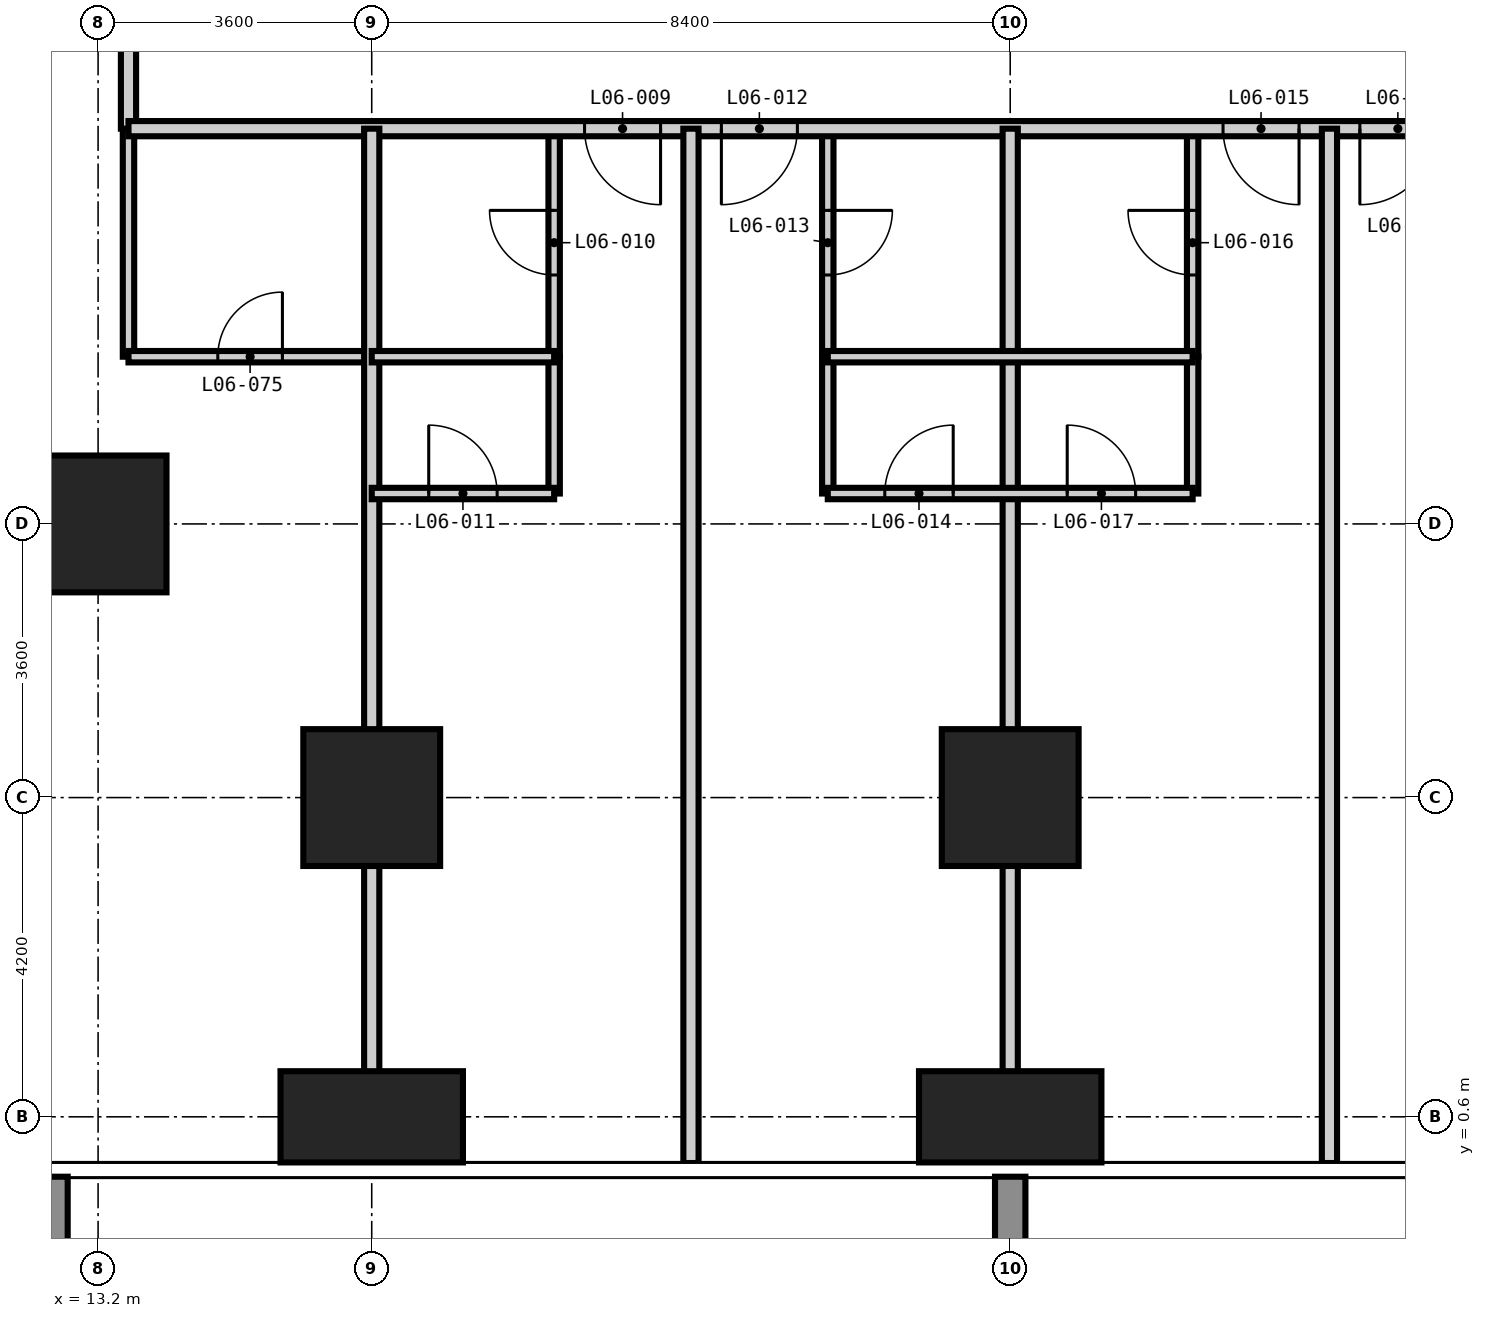
"""IFC4 building model, lengths in metres.
Left out: names, types, materials, properties, quantities, classifications, styles, units other than length and angle.
Written with IfcOpenShell. Run it as: python <this file> out.ifc"""

import sys

from ifc_helpers import new_model, si_unit, direction, frame, frame_2d, origin, origin_2d, place, context, subcontext, project, spatial, rectangle, extrude, element, fill, save


model = new_model("IFC4")
c1 = context("Model", 3, precision=1e-05, world=origin(), true_north=direction((0.0, 1.0)))
c2 = subcontext(c1, "Body", "Model", "MODEL_VIEW")
j1 = project(units=[si_unit("LENGTHUNIT", "METRE"), si_unit("PLANEANGLEUNIT", "RADIAN")], contexts=[c1])
p1 = place(None, origin())
s1 = spatial("IfcSite", under=j1, at=p1, CompositionType="ELEMENT")
p2 = place(p1, origin())
s2 = spatial("IfcBuilding", under=s1, at=p2, CompositionType="ELEMENT")
p3 = place(p2, frame((0.0, 0.0, 30.6)))
s3 = spatial("IfcBuildingStorey", under=s2, at=p3, CompositionType="ELEMENT", Elevation=30.6)
p4 = place(p3, frame((13.2, 8.4, -0.35), z_axis=(0.0, 0.0, 1.0), x_axis=(1.0, 0.0, 0.0)))
e1 = element("IfcColumn", 1, at=p4, inside=s3, PredefinedType="COLUMN", context=c2, shape_type="SweptSolid", body=[
    extrude(rectangle(XDim=1.8, YDim=1.8, at=origin_2d()), origin(), (0.0, 0.0, 1.0), 3.6),
])
p5 = place(p3, frame((16.8, 0.6, -0.35), z_axis=(0.0, 0.0, 1.0), x_axis=(1.0, 0.0, 0.0)))
e2 = element("IfcColumn", 2, at=p5, inside=s3, PredefinedType="COLUMN", context=c2, shape_type="SweptSolid", body=[
    extrude(rectangle(XDim=2.4, YDim=1.2, at=origin_2d()), origin(), (0.0, 0.0, 1.0), 3.6),
])
p6 = place(p3, frame((16.8, 4.8, -0.35), z_axis=(0.0, 0.0, 1.0), x_axis=(1.0, 0.0, 0.0)))
e3 = element("IfcColumn", 3, at=p6, inside=s3, PredefinedType="COLUMN", context=c2, shape_type="SweptSolid", body=[
    extrude(rectangle(XDim=1.8, YDim=1.8, at=origin_2d()), origin(), (0.0, 0.0, 1.0), 3.6),
])
p7 = place(p3, frame((25.2, 0.6, -0.35), z_axis=(0.0, 0.0, 1.0), x_axis=(1.0, 0.0, 0.0)))
e4 = element("IfcColumn", 4, at=p7, inside=s3, PredefinedType="COLUMN", context=c2, shape_type="SweptSolid", body=[
    extrude(rectangle(XDim=2.4, YDim=1.2, at=origin_2d()), origin(), (0.0, 0.0, 1.0), 3.6),
])
p8 = place(p3, frame((25.2, 4.8, -0.35), z_axis=(0.0, 0.0, 1.0), x_axis=(1.0, 0.0, 0.0)))
e5 = element("IfcColumn", 5, at=p8, inside=s3, PredefinedType="COLUMN", context=c2, shape_type="SweptSolid", body=[
    extrude(rectangle(XDim=1.8, YDim=1.8, at=origin_2d()), origin(), (0.0, 0.0, 1.0), 3.6),
])
p9 = place(p3, frame((13.6, 10.6, 0.0), z_axis=(0.0, 0.0, 1.0), x_axis=(0.0, 1.0, 0.0)))
e6 = element("IfcWall", 6, at=p9, inside=s3, PredefinedType="PARTITIONING", context=c2, shape_type="SweptSolid", body=[
    extrude(rectangle(XDim=3.0, YDim=0.15, at=frame_2d((1.5, 0.0))), origin(), (0.0, 0.0, 1.0), 3.25),
])
p10 = place(p3, frame((19.2, 10.6, 0.0), z_axis=(0.0, 0.0, 1.0), x_axis=(0.0, 1.0, 0.0)))
e7 = element("IfcWall", 7, at=p10, inside=s3, PredefinedType="PARTITIONING", context=c2, shape_type="SweptSolid", body=[
    extrude(rectangle(XDim=3.0, YDim=0.15, at=frame_2d((1.5, 0.0))), origin(), (0.0, 0.0, 1.0), 3.25),
])
p11 = place(p10, frame((1.075, 0.0, 0.0)))
e8 = element("IfcOpeningElement", 8, at=p11, cuts=e7, PredefinedType="OPENING", context=c2, shape_type="SweptSolid", body=[
    extrude(rectangle(XDim=0.85, YDim=2.1, at=frame_2d((0.425, 1.05))), frame((0.0, 0.085, 0.0), z_axis=(0.0, -1.0, 0.0), x_axis=(1.0, 0.0, 0.0)), (0.0, 0.0, 1.0), 0.17),
])
p12 = place(p3, frame((22.8, 10.6, 0.0), z_axis=(0.0, 0.0, 1.0), x_axis=(0.0, 1.0, 0.0)))
e9 = element("IfcWall", 9, at=p12, inside=s3, PredefinedType="PARTITIONING", context=c2, shape_type="SweptSolid", body=[
    extrude(rectangle(XDim=3.0, YDim=0.15, at=frame_2d((1.5, 0.0))), origin(), (0.0, 0.0, 1.0), 3.25),
])
p13 = place(p12, frame((1.075, 0.0, 0.0)))
e10 = element("IfcOpeningElement", 10, at=p13, cuts=e9, PredefinedType="OPENING", context=c2, shape_type="SweptSolid", body=[
    extrude(rectangle(XDim=0.85, YDim=2.1, at=frame_2d((0.425, 1.05))), frame((0.0, 0.085, 0.0), z_axis=(0.0, -1.0, 0.0), x_axis=(1.0, 0.0, 0.0)), (0.0, 0.0, 1.0), 0.17),
])
p14 = place(p3, frame((27.6, 10.6, 0.0), z_axis=(0.0, 0.0, 1.0), x_axis=(0.0, 1.0, 0.0)))
e11 = element("IfcWall", 11, at=p14, inside=s3, PredefinedType="PARTITIONING", context=c2, shape_type="SweptSolid", body=[
    extrude(rectangle(XDim=3.0, YDim=0.15, at=frame_2d((1.5, 0.0))), origin(), (0.0, 0.0, 1.0), 3.25),
])
p15 = place(p14, frame((1.075, 0.0, 0.0)))
e12 = element("IfcOpeningElement", 12, at=p15, cuts=e11, PredefinedType="OPENING", context=c2, shape_type="SweptSolid", body=[
    extrude(rectangle(XDim=0.85, YDim=2.1, at=frame_2d((0.425, 1.05))), frame((0.0, 0.085, 0.0), z_axis=(0.0, -1.0, 0.0), x_axis=(1.0, 0.0, 0.0)), (0.0, 0.0, 1.0), 0.17),
])
p16 = place(p3, frame((13.6, 10.6, 0.0), z_axis=(0.0, 0.0, 1.0), x_axis=(1.0, 0.0, 0.0)))
e13 = element("IfcWall", 13, at=p16, inside=s3, PredefinedType="PARTITIONING", context=c2, shape_type="SweptSolid", body=[
    extrude(rectangle(XDim=3.2, YDim=0.15, at=frame_2d((1.6, 0.0))), origin(), (0.0, 0.0, 1.0), 3.25),
])
p17 = place(p16, frame((1.175, 0.0, 0.0)))
e14 = element("IfcOpeningElement", 14, at=p17, cuts=e13, PredefinedType="OPENING", context=c2, shape_type="SweptSolid", body=[
    extrude(rectangle(XDim=0.85, YDim=2.1, at=frame_2d((0.425, 1.05))), frame((0.0, 0.085, 0.0), z_axis=(0.0, -1.0, 0.0), x_axis=(1.0, 0.0, 0.0)), (0.0, 0.0, 1.0), 0.17),
])
p18 = place(p3, frame((13.6, 13.6, 0.0), z_axis=(0.0, 0.0, 1.0), x_axis=(0.0, 1.0, 0.0)))
e15 = element("IfcWall", 15, at=p18, inside=s3, PredefinedType="PARTITIONING", context=c2, shape_type="SweptSolid", body=[
    extrude(rectangle(XDim=20.0, YDim=0.2, at=frame_2d((10.0, 0.0))), origin(), (0.0, 0.0, 1.0), 3.25),
])
p19 = place(p18, frame((6.0, 0.0, 0.0)))
e16 = element("IfcOpeningElement", 16, at=p19, cuts=e15, PredefinedType="OPENING", context=c2, shape_type="SweptSolid", body=[
    extrude(rectangle(XDim=1.0, YDim=2.2, at=frame_2d((0.5, 1.1))), frame((0.0, 0.11, 0.0), z_axis=(0.0, -1.0, 0.0), x_axis=(1.0, 0.0, 0.0)), (0.0, 0.0, 1.0), 0.22),
])
p20 = place(p18, frame((7.8, 0.0, 0.0)))
e17 = element("IfcOpeningElement", 17, at=p20, cuts=e15, PredefinedType="OPENING", context=c2, shape_type="SweptSolid", body=[
    extrude(rectangle(XDim=1.0, YDim=2.2, at=frame_2d((0.5, 1.1))), frame((0.0, 0.11, 0.0), z_axis=(0.0, -1.0, 0.0), x_axis=(1.0, 0.0, 0.0)), (0.0, 0.0, 1.0), 0.22),
])
p21 = place(p18, frame((14.4, 0.0, 0.0)))
e18 = element("IfcOpeningElement", 18, at=p21, cuts=e15, PredefinedType="OPENING", context=c2, shape_type="SweptSolid", body=[
    extrude(rectangle(XDim=1.0, YDim=2.2, at=frame_2d((0.5, 1.1))), frame((0.0, 0.11, 0.0), z_axis=(0.0, -1.0, 0.0), x_axis=(1.0, 0.0, 0.0)), (0.0, 0.0, 1.0), 0.22),
])
p22 = place(p18, frame((16.2, 0.0, 0.0)))
e19 = element("IfcOpeningElement", 19, at=p22, cuts=e15, PredefinedType="OPENING", context=c2, shape_type="SweptSolid", body=[
    extrude(rectangle(XDim=1.0, YDim=2.2, at=frame_2d((0.5, 1.1))), frame((0.0, 0.11, 0.0), z_axis=(0.0, -1.0, 0.0), x_axis=(1.0, 0.0, 0.0)), (0.0, 0.0, 1.0), 0.22),
])
p23 = place(p18, frame((1.1, 0.0, 0.0)))
e20 = element("IfcOpeningElement", 20, at=p23, cuts=e15, PredefinedType="OPENING", context=c2, shape_type="SweptSolid", body=[
    extrude(rectangle(XDim=1.0, YDim=2.2, at=frame_2d((0.5, 1.1))), frame((0.0, 0.11, 0.0), z_axis=(0.0, -1.0, 0.0), x_axis=(1.0, 0.0, 0.0)), (0.0, 0.0, 1.0), 0.22),
])
p24 = place(p3, frame((45.5, 13.6, 0.0), z_axis=(0.0, 0.0, 1.0), x_axis=(-1.0, 0.0, 0.0)))
e21 = element("IfcWall", 21, at=p24, inside=s3, PredefinedType="PARTITIONING", context=c2, shape_type="SweptSolid", body=[
    extrude(rectangle(XDim=31.9, YDim=0.2, at=frame_2d((15.95, 0.0))), origin(), (0.0, 0.0, 1.0), 3.25),
])
p25 = place(p24, frame((24.9, 0.0, 0.0)))
e22 = element("IfcOpeningElement", 22, at=p25, cuts=e21, PredefinedType="OPENING", context=c2, shape_type="SweptSolid", body=[
    extrude(rectangle(XDim=1.0, YDim=2.2, at=frame_2d((0.5, 1.1))), frame((0.0, 0.11, 0.0), z_axis=(0.0, -1.0, 0.0), x_axis=(1.0, 0.0, 0.0)), (0.0, 0.0, 1.0), 0.22),
])
p26 = place(p24, frame((23.1, 0.0, 0.0)))
e23 = element("IfcOpeningElement", 23, at=p26, cuts=e21, PredefinedType="OPENING", context=c2, shape_type="SweptSolid", body=[
    extrude(rectangle(XDim=1.0, YDim=2.2, at=frame_2d((0.5, 1.1))), frame((0.0, 0.11, 0.0), z_axis=(0.0, -1.0, 0.0), x_axis=(1.0, 0.0, 0.0)), (0.0, 0.0, 1.0), 0.22),
])
p27 = place(p24, frame((16.5, 0.0, 0.0)))
e24 = element("IfcOpeningElement", 24, at=p27, cuts=e21, PredefinedType="OPENING", context=c2, shape_type="SweptSolid", body=[
    extrude(rectangle(XDim=1.0, YDim=2.2, at=frame_2d((0.5, 1.1))), frame((0.0, 0.11, 0.0), z_axis=(0.0, -1.0, 0.0), x_axis=(1.0, 0.0, 0.0)), (0.0, 0.0, 1.0), 0.22),
])
p28 = place(p24, frame((14.7, 0.0, 0.0)))
e25 = element("IfcOpeningElement", 25, at=p28, cuts=e21, PredefinedType="OPENING", context=c2, shape_type="SweptSolid", body=[
    extrude(rectangle(XDim=1.0, YDim=2.2, at=frame_2d((0.5, 1.1))), frame((0.0, 0.11, 0.0), z_axis=(0.0, -1.0, 0.0), x_axis=(1.0, 0.0, 0.0)), (0.0, 0.0, 1.0), 0.22),
])
p29 = place(p24, frame((8.1, 0.0, 0.0)))
e26 = element("IfcOpeningElement", 26, at=p29, cuts=e21, PredefinedType="OPENING", context=c2, shape_type="SweptSolid", body=[
    extrude(rectangle(XDim=1.0, YDim=2.2, at=frame_2d((0.5, 1.1))), frame((0.0, 0.11, 0.0), z_axis=(0.0, -1.0, 0.0), x_axis=(1.0, 0.0, 0.0)), (0.0, 0.0, 1.0), 0.22),
])
p30 = place(p24, frame((6.3, 0.0, 0.0)))
e27 = element("IfcOpeningElement", 27, at=p30, cuts=e21, PredefinedType="OPENING", context=c2, shape_type="SweptSolid", body=[
    extrude(rectangle(XDim=1.0, YDim=2.2, at=frame_2d((0.5, 1.1))), frame((0.0, 0.11, 0.0), z_axis=(0.0, -1.0, 0.0), x_axis=(1.0, 0.0, 0.0)), (0.0, 0.0, 1.0), 0.22),
])
for number, where, z_axis, x_axis in (
    (28, (16.8, -0.008, 0.0), (0.0, 0.0, 1.0), (0.0, 1.0, 0.0)),
    (29, (21.0, -0.008, 0.0), (0.0, 0.0, 1.0), (0.0, 1.0, 0.0)),
    (30, (25.2, -0.008, 0.0), (0.0, 0.0, 1.0), (0.0, 1.0, 0.0)),
    (31, (29.4, -0.008, 0.0), (0.0, 0.0, 1.0), (0.0, 1.0, 0.0)),
):
    element("IfcWall", number, at=place(p3, frame(where, z_axis=z_axis, x_axis=x_axis)), inside=s3, PredefinedType="PARTITIONING", context=c2, shape_type="SweptSolid", body=[
        extrude(rectangle(XDim=13.608, YDim=0.2, at=frame_2d((6.804, 0.0))), origin(), (0.0, 0.0, 1.0), 3.25),
    ])
for number, where, z_axis, x_axis in (
    (32, (19.2, 8.8, 0.0), (0.0, 0.0, 1.0), (0.0, 1.0, 0.0)),
    (33, (22.8, 8.8, 0.0), (0.0, 0.0, 1.0), (0.0, 1.0, 0.0)),
    (34, (27.6, 8.8, 0.0), (0.0, 0.0, 1.0), (0.0, 1.0, 0.0)),
):
    element("IfcWall", number, at=place(p3, frame(where, z_axis=z_axis, x_axis=x_axis)), inside=s3, PredefinedType="PARTITIONING", context=c2, shape_type="SweptSolid", body=[
        extrude(rectangle(XDim=1.8, YDim=0.15, at=frame_2d((0.9, 0.0))), origin(), (0.0, 0.0, 1.0), 3.25),
    ])
p31 = place(p3, frame((16.8, 8.8, 0.0), z_axis=(0.0, 0.0, 1.0), x_axis=(1.0, 0.0, 0.0)))
e35 = element("IfcWall", 35, at=p31, inside=s3, PredefinedType="PARTITIONING", context=c2, shape_type="SweptSolid", body=[
    extrude(rectangle(XDim=2.4, YDim=0.15, at=frame_2d((1.2, 0.0))), origin(), (0.0, 0.0, 1.0), 3.25),
])
p32 = place(p31, frame((0.75, 0.0, 0.0)))
e36 = element("IfcOpeningElement", 36, at=p32, cuts=e35, PredefinedType="OPENING", context=c2, shape_type="SweptSolid", body=[
    extrude(rectangle(XDim=0.9, YDim=2.1, at=frame_2d((0.45, 1.05))), frame((0.0, 0.085, 0.0), z_axis=(0.0, -1.0, 0.0), x_axis=(1.0, 0.0, 0.0)), (0.0, 0.0, 1.0), 0.17),
])
p33 = place(p3, frame((22.8, 8.8, 0.0), z_axis=(0.0, 0.0, 1.0), x_axis=(1.0, 0.0, 0.0)))
e37 = element("IfcWall", 37, at=p33, inside=s3, PredefinedType="PARTITIONING", context=c2, shape_type="SweptSolid", body=[
    extrude(rectangle(XDim=4.8, YDim=0.15, at=frame_2d((2.4, 0.0))), origin(), (0.0, 0.0, 1.0), 3.25),
])
p34 = place(p33, frame((0.75, 0.0, 0.0)))
e38 = element("IfcOpeningElement", 38, at=p34, cuts=e37, PredefinedType="OPENING", context=c2, shape_type="SweptSolid", body=[
    extrude(rectangle(XDim=0.9, YDim=2.1, at=frame_2d((0.45, 1.05))), frame((0.0, 0.085, 0.0), z_axis=(0.0, -1.0, 0.0), x_axis=(1.0, 0.0, 0.0)), (0.0, 0.0, 1.0), 0.17),
])
p35 = place(p33, frame((3.15, 0.0, 0.0)))
e39 = element("IfcOpeningElement", 39, at=p35, cuts=e37, PredefinedType="OPENING", context=c2, shape_type="SweptSolid", body=[
    extrude(rectangle(XDim=0.9, YDim=2.1, at=frame_2d((0.45, 1.05))), frame((0.0, 0.085, 0.0), z_axis=(0.0, -1.0, 0.0), x_axis=(1.0, 0.0, 0.0)), (0.0, 0.0, 1.0), 0.17),
])
p36 = place(p3, frame((16.8, 10.6, 0.0), z_axis=(0.0, 0.0, 1.0), x_axis=(1.0, 0.0, 0.0)))
e40 = element("IfcWall", 40, at=p36, inside=s3, PredefinedType="PARTITIONING", context=c2, shape_type="SweptSolid", body=[
    extrude(rectangle(XDim=2.4, YDim=0.15, at=frame_2d((1.2, 0.0))), origin(), (0.0, 0.0, 1.0), 3.25),
])
p37 = place(p3, frame((22.8, 10.6, 0.0), z_axis=(0.0, 0.0, 1.0), x_axis=(1.0, 0.0, 0.0)))
e41 = element("IfcWall", 41, at=p37, inside=s3, PredefinedType="PARTITIONING", context=c2, shape_type="SweptSolid", body=[
    extrude(rectangle(XDim=4.8, YDim=0.15, at=frame_2d((2.4, 0.0))), origin(), (0.0, 0.0, 1.0), 3.25),
])
p38 = place(p25, origin())
e42 = element("IfcDoor", 42, at=p38, inside=s3, OperationType="SINGLE_SWING_LEFT", PredefinedType="DOOR", context=c2, shape_type="SweptSolid", body=[
    extrude(rectangle(XDim=1.0, YDim=2.2, at=frame_2d((0.5, 1.1))), frame((0.0, 0.025, 0.0), z_axis=(0.0, -1.0, 0.0), x_axis=(1.0, 0.0, 0.0)), (0.0, 0.0, 1.0), 0.05),
])
fill(e22, e42)
p39 = place(p11, origin())
e43 = element("IfcDoor", 43, at=p39, inside=s3, OperationType="SINGLE_SWING_RIGHT", PredefinedType="DOOR", context=c2, shape_type="SweptSolid", body=[
    extrude(rectangle(XDim=0.85, YDim=2.1, at=frame_2d((0.425, 1.05))), frame((0.0, 0.025, 0.0), z_axis=(0.0, -1.0, 0.0), x_axis=(1.0, 0.0, 0.0)), (0.0, 0.0, 1.0), 0.05),
])
fill(e8, e43)
p40 = place(p32, origin())
e44 = element("IfcDoor", 44, at=p40, inside=s3, OperationType="SINGLE_SWING_LEFT", PredefinedType="DOOR", context=c2, shape_type="SweptSolid", body=[
    extrude(rectangle(XDim=0.9, YDim=2.1, at=frame_2d((0.45, 1.05))), frame((0.0, 0.025, 0.0), z_axis=(0.0, -1.0, 0.0), x_axis=(1.0, 0.0, 0.0)), (0.0, 0.0, 1.0), 0.05),
])
fill(e36, e44)
p41 = place(p26, origin())
e45 = element("IfcDoor", 45, at=p41, inside=s3, OperationType="SINGLE_SWING_RIGHT", PredefinedType="DOOR", context=c2, shape_type="SweptSolid", body=[
    extrude(rectangle(XDim=1.0, YDim=2.2, at=frame_2d((0.5, 1.1))), frame((0.0, 0.025, 0.0), z_axis=(0.0, -1.0, 0.0), x_axis=(1.0, 0.0, 0.0)), (0.0, 0.0, 1.0), 0.05),
])
fill(e23, e45)
p42 = place(p13, frame((0.85, 0.0, 0.0), z_axis=(0.0, 0.0, 1.0), x_axis=(-1.0, 0.0, 0.0)))
e46 = element("IfcDoor", 46, at=p42, inside=s3, OperationType="SINGLE_SWING_LEFT", PredefinedType="DOOR", context=c2, shape_type="SweptSolid", body=[
    extrude(rectangle(XDim=0.85, YDim=2.1, at=frame_2d((0.425, 1.05))), frame((0.0, 0.025, 0.0), z_axis=(0.0, -1.0, 0.0), x_axis=(1.0, 0.0, 0.0)), (0.0, 0.0, 1.0), 0.05),
])
fill(e10, e46)
p43 = place(p34, origin())
e47 = element("IfcDoor", 47, at=p43, inside=s3, OperationType="SINGLE_SWING_RIGHT", PredefinedType="DOOR", context=c2, shape_type="SweptSolid", body=[
    extrude(rectangle(XDim=0.9, YDim=2.1, at=frame_2d((0.45, 1.05))), frame((0.0, 0.025, 0.0), z_axis=(0.0, -1.0, 0.0), x_axis=(1.0, 0.0, 0.0)), (0.0, 0.0, 1.0), 0.05),
])
fill(e38, e47)
p44 = place(p27, origin())
e48 = element("IfcDoor", 48, at=p44, inside=s3, OperationType="SINGLE_SWING_LEFT", PredefinedType="DOOR", context=c2, shape_type="SweptSolid", body=[
    extrude(rectangle(XDim=1.0, YDim=2.2, at=frame_2d((0.5, 1.1))), frame((0.0, 0.025, 0.0), z_axis=(0.0, -1.0, 0.0), x_axis=(1.0, 0.0, 0.0)), (0.0, 0.0, 1.0), 0.05),
])
fill(e24, e48)
p45 = place(p15, origin())
e49 = element("IfcDoor", 49, at=p45, inside=s3, OperationType="SINGLE_SWING_RIGHT", PredefinedType="DOOR", context=c2, shape_type="SweptSolid", body=[
    extrude(rectangle(XDim=0.85, YDim=2.1, at=frame_2d((0.425, 1.05))), frame((0.0, 0.025, 0.0), z_axis=(0.0, -1.0, 0.0), x_axis=(1.0, 0.0, 0.0)), (0.0, 0.0, 1.0), 0.05),
])
fill(e12, e49)
p46 = place(p35, origin())
e50 = element("IfcDoor", 50, at=p46, inside=s3, OperationType="SINGLE_SWING_LEFT", PredefinedType="DOOR", context=c2, shape_type="SweptSolid", body=[
    extrude(rectangle(XDim=0.9, YDim=2.1, at=frame_2d((0.45, 1.05))), frame((0.0, 0.025, 0.0), z_axis=(0.0, -1.0, 0.0), x_axis=(1.0, 0.0, 0.0)), (0.0, 0.0, 1.0), 0.05),
])
fill(e39, e50)
p47 = place(p28, origin())
e51 = element("IfcDoor", 51, at=p47, inside=s3, OperationType="SINGLE_SWING_RIGHT", PredefinedType="DOOR", context=c2, shape_type="SweptSolid", body=[
    extrude(rectangle(XDim=1.0, YDim=2.2, at=frame_2d((0.5, 1.1))), frame((0.0, 0.025, 0.0), z_axis=(0.0, -1.0, 0.0), x_axis=(1.0, 0.0, 0.0)), (0.0, 0.0, 1.0), 0.05),
])
fill(e25, e51)
p48 = place(p17, origin())
e52 = element("IfcDoor", 52, at=p48, inside=s3, OperationType="SINGLE_SWING_RIGHT", PredefinedType="DOOR", context=c2, shape_type="SweptSolid", body=[
    extrude(rectangle(XDim=0.85, YDim=2.1, at=frame_2d((0.425, 1.05))), frame((0.0, 0.025, 0.0), z_axis=(0.0, -1.0, 0.0), x_axis=(1.0, 0.0, 0.0)), (0.0, 0.0, 1.0), 0.05),
])
fill(e14, e52)
save(model, sys.argv[1])
